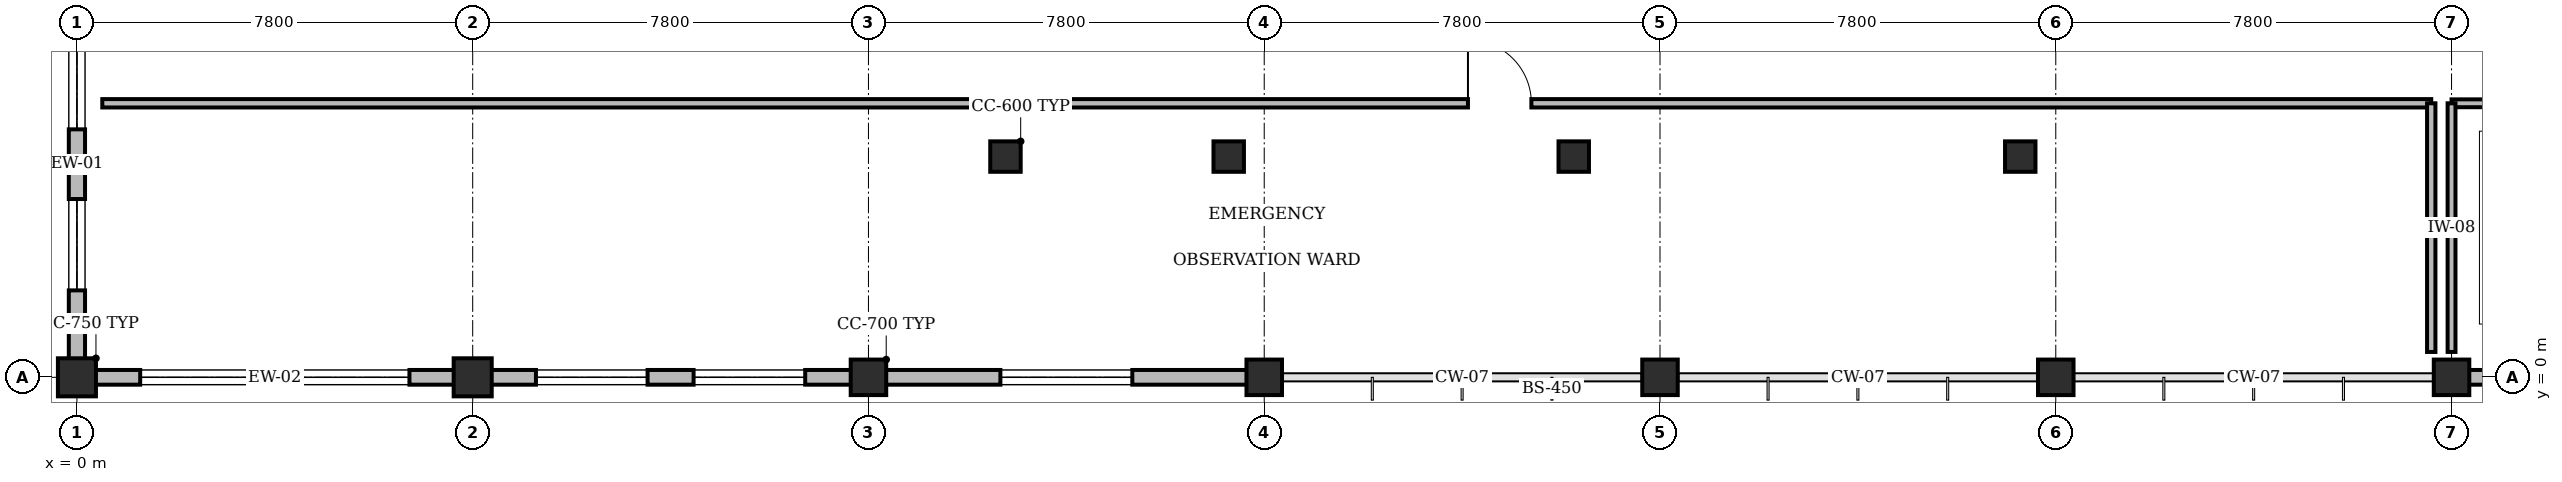
"""IFC4 building model, lengths in metres.
Left out: names, types, materials, properties, quantities, classifications, styles, units other than length and angle.
Written with IfcOpenShell. Run it as: python <this file> out.ifc"""

import sys

from ifc_helpers import new_model, si_unit, direction, frame, frame_2d, origin, origin_2d, place, context, subcontext, project, spatial, rectangle, circle, extrude, element, fill, save


model = new_model("IFC4")
c1 = context("Model", 3, precision=1e-05, world=origin(), true_north=direction((0.0, 1.0)))
c2 = subcontext(c1, "Body", "Model", "MODEL_VIEW")
j1 = project(units=[si_unit("LENGTHUNIT", "METRE"), si_unit("PLANEANGLEUNIT", "RADIAN")], contexts=[c1])
p1 = place(None, origin())
s1 = spatial("IfcSite", under=j1, at=p1, CompositionType="ELEMENT")
p2 = place(p1, origin())
s2 = spatial("IfcBuilding", under=s1, at=p2, CompositionType="ELEMENT")
p3 = place(p2, frame((0.0, 0.0, 4.8)))
s3 = spatial("IfcBuildingStorey", under=s2, at=p3, CompositionType="ELEMENT", Elevation=4.8)
for number, where, z_axis, x_axis in (
    (1, (0.0, 0.0, 0.0), (0.0, 0.0, 1.0), (1.0, 0.0, 0.0)),
    (2, (7.8, 0.0, 0.0), (0.0, 0.0, 1.0), (1.0, 0.0, 0.0)),
):
    element("IfcColumn", number, at=place(p3, frame(where, z_axis=z_axis, x_axis=x_axis)), inside=s3, PredefinedType="COLUMN", context=c2, shape_type="SweptSolid", body=[
        extrude(rectangle(XDim=0.75, YDim=0.75, at=origin_2d()), origin(), (0.0, 0.0, 1.0), 4.8),
    ])
for number, where, z_axis, x_axis in (
    (3, (15.6, 0.0, 0.0), (0.0, 0.0, 1.0), (1.0, 0.0, 0.0)),
    (4, (23.4, 0.0, 0.0), (0.0, 0.0, 1.0), (1.0, 0.0, 0.0)),
    (5, (31.2, 0.0, 0.0), (0.0, 0.0, 1.0), (1.0, 0.0, 0.0)),
    (6, (39.0, 0.0, 0.0), (0.0, 0.0, 1.0), (1.0, 0.0, 0.0)),
    (7, (46.8, 0.0, 0.0), (0.0, 0.0, 1.0), (1.0, 0.0, 0.0)),
):
    element("IfcColumn", number, at=place(p3, frame(where, z_axis=z_axis, x_axis=x_axis)), inside=s3, PredefinedType="PILASTER", context=c2, shape_type="SweptSolid", body=[
        extrude(circle(Radius=0.35, at=origin_2d()), origin(), (0.0, 0.0, 1.0), 4.8),
    ])
for number, where, z_axis, x_axis in (
    (8, (18.3, 4.35, 0.0), (0.0, 0.0, 1.0), (1.0, 0.0, 0.0)),
    (9, (22.7, 4.35, 0.0), (0.0, 0.0, 1.0), (1.0, 0.0, 0.0)),
    (10, (29.5, 4.35, 0.0), (0.0, 0.0, 1.0), (1.0, 0.0, 0.0)),
    (11, (38.3, 4.35, 0.0), (0.0, 0.0, 1.0), (1.0, 0.0, 0.0)),
):
    element("IfcColumn", number, at=place(p3, frame(where, z_axis=z_axis, x_axis=x_axis)), inside=s3, PredefinedType="PILASTER", context=c2, shape_type="SweptSolid", body=[
        extrude(circle(Radius=0.3, at=origin_2d()), origin(), (0.0, 0.0, 1.0), 4.8),
    ])
p4 = place(p3, frame((7.46, 0.0, 0.0), z_axis=(0.0, 0.0, 1.0), x_axis=(-1.0, 0.0, 0.0)))
e12 = element("IfcWall", 12, at=p4, inside=s3, PredefinedType="STANDARD", context=c2, shape_type="SweptSolid", body=[
    extrude(rectangle(XDim=7.12, YDim=0.29, at=frame_2d((3.56, 0.0))), origin(), (0.0, 0.0, 1.0), 3.68),
])
p5 = place(p4, frame((0.907, 0.0, 0.9)))
e13 = element("IfcOpeningElement", 13, at=p5, cuts=e12, PredefinedType="OPENING", context=c2, shape_type="SweptSolid", body=[
    extrude(rectangle(XDim=2.2, YDim=1.65, at=frame_2d((1.1, 0.825))), frame((0.0, 0.155, 0.0), z_axis=(0.0, -1.0, 0.0), x_axis=(1.0, 0.0, 0.0)), (0.0, 0.0, 1.0), 0.31),
])
p6 = place(p4, frame((4.013, 0.0, 0.9)))
e14 = element("IfcOpeningElement", 14, at=p6, cuts=e12, PredefinedType="OPENING", context=c2, shape_type="SweptSolid", body=[
    extrude(rectangle(XDim=2.2, YDim=1.65, at=frame_2d((1.1, 0.825))), frame((0.0, 0.155, 0.0), z_axis=(0.0, -1.0, 0.0), x_axis=(1.0, 0.0, 0.0)), (0.0, 0.0, 1.0), 0.31),
])
p7 = place(p3, frame((15.26, 0.0, 0.0), z_axis=(0.0, 0.0, 1.0), x_axis=(-1.0, 0.0, 0.0)))
e15 = element("IfcWall", 15, at=p7, inside=s3, PredefinedType="STANDARD", context=c2, shape_type="SweptSolid", body=[
    extrude(rectangle(XDim=7.12, YDim=0.29, at=frame_2d((3.56, 0.0))), origin(), (0.0, 0.0, 1.0), 3.68),
])
p8 = place(p7, frame((0.907, 0.0, 0.9)))
e16 = element("IfcOpeningElement", 16, at=p8, cuts=e15, PredefinedType="OPENING", context=c2, shape_type="SweptSolid", body=[
    extrude(rectangle(XDim=2.2, YDim=1.65, at=frame_2d((1.1, 0.825))), frame((0.0, 0.155, 0.0), z_axis=(0.0, -1.0, 0.0), x_axis=(1.0, 0.0, 0.0)), (0.0, 0.0, 1.0), 0.31),
])
p9 = place(p7, frame((4.013, 0.0, 0.9)))
e17 = element("IfcOpeningElement", 17, at=p9, cuts=e15, PredefinedType="OPENING", context=c2, shape_type="SweptSolid", body=[
    extrude(rectangle(XDim=2.2, YDim=1.65, at=frame_2d((1.1, 0.825))), frame((0.0, 0.155, 0.0), z_axis=(0.0, -1.0, 0.0), x_axis=(1.0, 0.0, 0.0)), (0.0, 0.0, 1.0), 0.31),
])
p10 = place(p3, frame((0.0, 0.34, 0.0), z_axis=(0.0, 0.0, 1.0), x_axis=(0.0, 1.0, 0.0)))
e18 = element("IfcWall", 18, at=p10, inside=s3, PredefinedType="STANDARD", context=c2, shape_type="SweptSolid", body=[
    extrude(rectangle(XDim=7.72, YDim=0.32, at=frame_2d((3.86, 0.0))), origin(), (0.0, 0.0, 1.0), 3.665),
])
p11 = place(p10, frame((1.373, 0.0, 0.9)))
e19 = element("IfcOpeningElement", 19, at=p11, cuts=e18, PredefinedType="OPENING", context=c2, shape_type="SweptSolid", body=[
    extrude(rectangle(XDim=1.8, YDim=1.65, at=frame_2d((0.9, 0.825))), frame((0.0, 0.17, 0.0), z_axis=(0.0, -1.0, 0.0), x_axis=(1.0, 0.0, 0.0)), (0.0, 0.0, 1.0), 0.34),
])
p12 = place(p10, frame((4.547, 0.0, 0.9)))
e20 = element("IfcOpeningElement", 20, at=p12, cuts=e18, PredefinedType="OPENING", context=c2, shape_type="SweptSolid", body=[
    extrude(rectangle(XDim=1.8, YDim=1.65, at=frame_2d((0.9, 0.825))), frame((0.0, 0.17, 0.0), z_axis=(0.0, -1.0, 0.0), x_axis=(1.0, 0.0, 0.0)), (0.0, 0.0, 1.0), 0.34),
])
p13 = place(p3, frame((23.06, 0.0, 0.0), z_axis=(0.0, 0.0, 1.0), x_axis=(-1.0, 0.0, 0.0)))
e21 = element("IfcWall", 21, at=p13, inside=s3, PredefinedType="STANDARD", context=c2, shape_type="SweptSolid", body=[
    extrude(rectangle(XDim=7.12, YDim=0.29, at=frame_2d((3.56, 0.0))), origin(), (0.0, 0.0, 1.0), 3.68),
])
p14 = place(p13, frame((2.26, 0.0, 0.9)))
e22 = element("IfcOpeningElement", 22, at=p14, cuts=e21, PredefinedType="OPENING", context=c2, shape_type="SweptSolid", body=[
    extrude(rectangle(XDim=2.6, YDim=1.65, at=frame_2d((1.3, 0.825))), frame((0.0, 0.155, 0.0), z_axis=(0.0, -1.0, 0.0), x_axis=(1.0, 0.0, 0.0)), (0.0, 0.0, 1.0), 0.31),
])
p15 = place(p3, frame((54.26, 0.0, 0.0), z_axis=(0.0, 0.0, 1.0), x_axis=(-1.0, 0.0, 0.0)))
e23 = element("IfcWall", 23, at=p15, inside=s3, PredefinedType="STANDARD", context=c2, shape_type="SweptSolid", body=[
    extrude(rectangle(XDim=7.12, YDim=0.29, at=frame_2d((3.56, 0.0))), origin(), (0.0, 0.0, 1.0), 3.68),
])
p16 = place(p15, frame((2.26, 0.0, 0.9)))
e24 = element("IfcOpeningElement", 24, at=p16, cuts=e23, PredefinedType="OPENING", context=c2, shape_type="SweptSolid", body=[
    extrude(rectangle(XDim=2.6, YDim=1.65, at=frame_2d((1.3, 0.825))), frame((0.0, 0.155, 0.0), z_axis=(0.0, -1.0, 0.0), x_axis=(1.0, 0.0, 0.0)), (0.0, 0.0, 1.0), 0.31),
])
p17 = place(p3, frame((0.5, 5.4, 0.0), z_axis=(0.0, 0.0, 1.0), x_axis=(1.0, 0.0, 0.0)))
e25 = element("IfcWall", 25, at=p17, inside=s3, PredefinedType="PARTITIONING", context=c2, shape_type="SweptSolid", body=[
    extrude(rectangle(XDim=45.9, YDim=0.165, at=frame_2d((22.95, 0.0))), origin(), (0.0, 0.0, 1.0), 4.46),
])
p18 = place(p17, frame((26.915, 0.0, 0.0)))
e26 = element("IfcOpeningElement", 26, at=p18, cuts=e25, PredefinedType="OPENING", context=c2, shape_type="SweptSolid", body=[
    extrude(rectangle(XDim=1.25, YDim=2.15, at=frame_2d((0.625, 1.075))), frame((0.0, 0.093, 0.0), z_axis=(0.0, -1.0, 0.0), x_axis=(1.0, 0.0, 0.0)), (0.0, 0.0, 1.0), 0.185),
])
p19 = place(p3, frame((46.4, 0.5, 0.0), z_axis=(0.0, 0.0, 1.0), x_axis=(0.0, 1.0, 0.0)))
e27 = element("IfcWall", 27, at=p19, inside=s3, PredefinedType="PARTITIONING", context=c2, shape_type="SweptSolid", body=[
    extrude(rectangle(XDim=4.9, YDim=0.165, at=frame_2d((2.45, 0.0))), origin(), (0.0, 0.0, 1.0), 3.68),
])
p20 = place(p3, frame((46.8, 5.4, 0.0), z_axis=(0.0, 0.0, 1.0), x_axis=(1.0, 0.0, 0.0)))
e28 = element("IfcWall", 28, at=p20, inside=s3, PredefinedType="PARTITIONING", context=c2, shape_type="SweptSolid", body=[
    extrude(rectangle(XDim=46.6, YDim=0.155, at=frame_2d((23.3, 0.0))), origin(), (0.0, 0.0, 1.0), 4.46),
])
p21 = place(p20, frame((22.6, 0.0, 0.0)))
e29 = element("IfcOpeningElement", 29, at=p21, cuts=e28, PredefinedType="OPENING", context=c2, shape_type="SweptSolid", body=[
    extrude(rectangle(XDim=1.4, YDim=2.2, at=frame_2d((0.7, 1.1))), frame((0.0, 0.087, 0.0), z_axis=(0.0, -1.0, 0.0), x_axis=(1.0, 0.0, 0.0)), (0.0, 0.0, 1.0), 0.175),
])
p22 = place(p3, frame((46.8, 0.5, 0.0), z_axis=(0.0, 0.0, 1.0), x_axis=(0.0, 1.0, 0.0)))
e30 = element("IfcWall", 30, at=p22, inside=s3, PredefinedType="PARTITIONING", context=c2, shape_type="SweptSolid", body=[
    extrude(rectangle(XDim=4.9, YDim=0.155, at=frame_2d((2.45, 0.0))), origin(), (0.0, 0.0, 1.0), 3.665),
])
p23 = place(p5, origin())
e31 = element("IfcWindow", 31, at=p23, inside=s3, PartitioningType="SINGLE_PANEL", PredefinedType="WINDOW", context=c2, shape_type="SweptSolid", body=[
    extrude(rectangle(XDim=2.2, YDim=1.65, at=frame_2d((1.1, 0.825))), frame((0.0, 0.03, 0.0), z_axis=(0.0, -1.0, 0.0), x_axis=(1.0, 0.0, 0.0)), (0.0, 0.0, 1.0), 0.06),
])
fill(e13, e31)
p24 = place(p6, origin())
e32 = element("IfcWindow", 32, at=p24, inside=s3, PartitioningType="SINGLE_PANEL", PredefinedType="WINDOW", context=c2, shape_type="SweptSolid", body=[
    extrude(rectangle(XDim=2.2, YDim=1.65, at=frame_2d((1.1, 0.825))), frame((0.0, 0.03, 0.0), z_axis=(0.0, -1.0, 0.0), x_axis=(1.0, 0.0, 0.0)), (0.0, 0.0, 1.0), 0.06),
])
fill(e14, e32)
p25 = place(p8, origin())
e33 = element("IfcWindow", 33, at=p25, inside=s3, PartitioningType="SINGLE_PANEL", PredefinedType="WINDOW", context=c2, shape_type="SweptSolid", body=[
    extrude(rectangle(XDim=2.2, YDim=1.65, at=frame_2d((1.1, 0.825))), frame((0.0, 0.03, 0.0), z_axis=(0.0, -1.0, 0.0), x_axis=(1.0, 0.0, 0.0)), (0.0, 0.0, 1.0), 0.06),
])
fill(e16, e33)
p26 = place(p9, origin())
e34 = element("IfcWindow", 34, at=p26, inside=s3, PartitioningType="SINGLE_PANEL", PredefinedType="WINDOW", context=c2, shape_type="SweptSolid", body=[
    extrude(rectangle(XDim=2.2, YDim=1.65, at=frame_2d((1.1, 0.825))), frame((0.0, 0.03, 0.0), z_axis=(0.0, -1.0, 0.0), x_axis=(1.0, 0.0, 0.0)), (0.0, 0.0, 1.0), 0.06),
])
fill(e17, e34)
p27 = place(p11, origin())
e35 = element("IfcWindow", 35, at=p27, inside=s3, PartitioningType="SINGLE_PANEL", PredefinedType="WINDOW", context=c2, shape_type="SweptSolid", body=[
    extrude(rectangle(XDim=1.8, YDim=1.65, at=frame_2d((0.9, 0.825))), frame((0.0, 0.03, 0.0), z_axis=(0.0, -1.0, 0.0), x_axis=(1.0, 0.0, 0.0)), (0.0, 0.0, 1.0), 0.06),
])
fill(e19, e35)
p28 = place(p12, origin())
e36 = element("IfcWindow", 36, at=p28, inside=s3, PartitioningType="SINGLE_PANEL", PredefinedType="WINDOW", context=c2, shape_type="SweptSolid", body=[
    extrude(rectangle(XDim=1.8, YDim=1.65, at=frame_2d((0.9, 0.825))), frame((0.0, 0.03, 0.0), z_axis=(0.0, -1.0, 0.0), x_axis=(1.0, 0.0, 0.0)), (0.0, 0.0, 1.0), 0.06),
])
fill(e20, e36)
p29 = place(p14, origin())
e37 = element("IfcWindow", 37, at=p29, inside=s3, PartitioningType="SINGLE_PANEL", PredefinedType="WINDOW", context=c2, shape_type="SweptSolid", body=[
    extrude(rectangle(XDim=2.6, YDim=1.65, at=frame_2d((1.3, 0.825))), frame((0.0, 0.03, 0.0), z_axis=(0.0, -1.0, 0.0), x_axis=(1.0, 0.0, 0.0)), (0.0, 0.0, 1.0), 0.06),
])
fill(e22, e37)
p30 = place(p18, origin())
e38 = element("IfcDoor", 38, at=p30, inside=s3, OperationType="SINGLE_SWING_LEFT", PredefinedType="DOOR", context=c2, shape_type="SweptSolid", body=[
    extrude(rectangle(XDim=1.25, YDim=2.15, at=frame_2d((0.625, 1.075))), frame((0.0, 0.025, 0.0), z_axis=(0.0, -1.0, 0.0), x_axis=(1.0, 0.0, 0.0)), (0.0, 0.0, 1.0), 0.05),
])
fill(e26, e38)
save(model, sys.argv[1])
